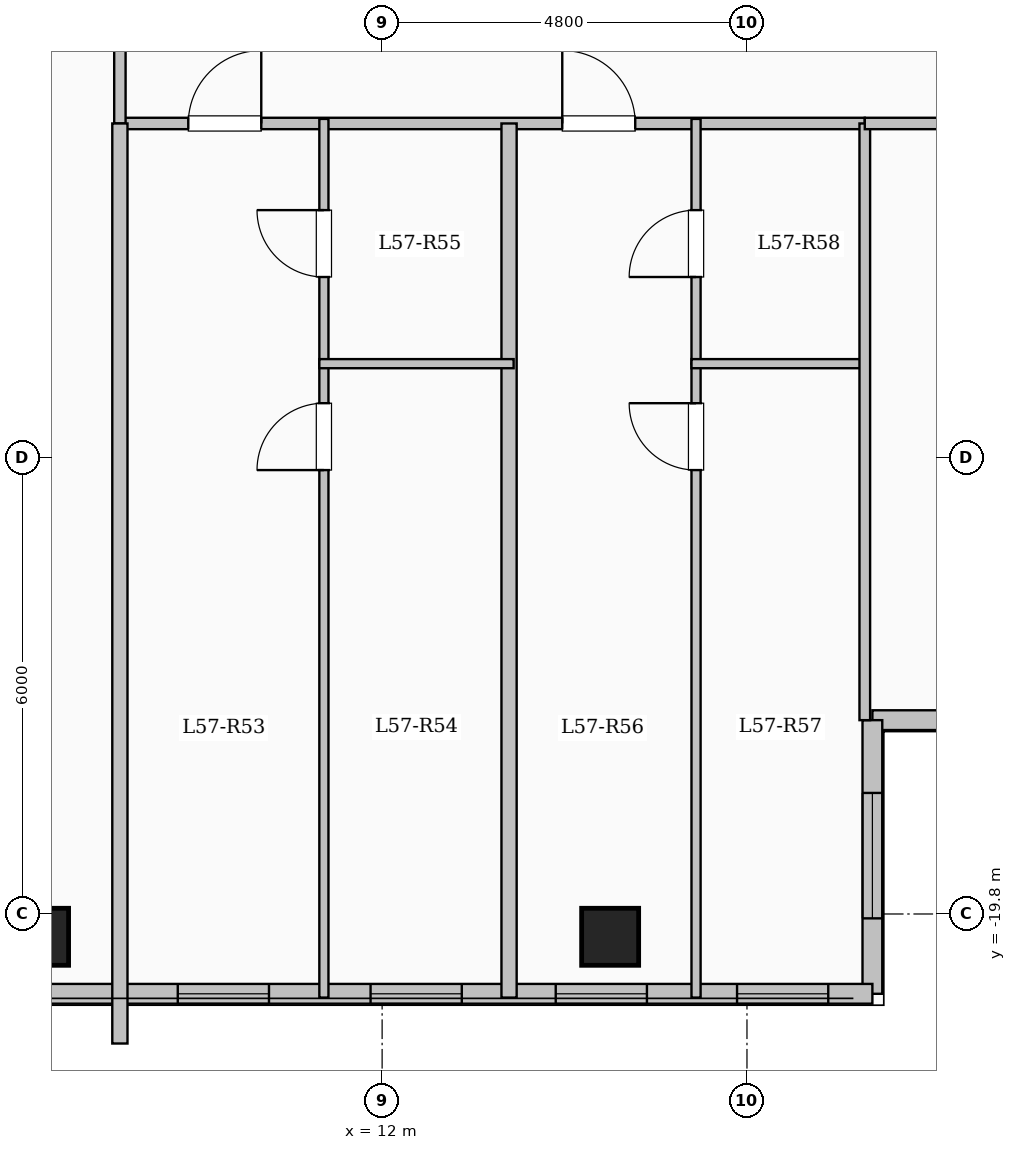
"""IFC4 building model, lengths in metres.
Left out: names, types, materials, properties, quantities, classifications, styles, units other than length and angle.
Written with IfcOpenShell. Run it as: python <this file> out.ifc"""

import sys

from ifc_helpers import new_model, si_unit, direction, frame, frame_2d, origin, origin_2d, place, context, subcontext, project, spatial, rectangle, extrude, element, fill, save


model = new_model("IFC4")
c1 = context("Model", 3, precision=1e-05, world=origin(), true_north=direction((0.0, 1.0)))
c2 = subcontext(c1, "Body", "Model", "MODEL_VIEW")
j1 = project(units=[si_unit("LENGTHUNIT", "METRE"), si_unit("PLANEANGLEUNIT", "RADIAN")], contexts=[c1])
p1 = place(None, origin())
s1 = spatial("IfcSite", under=j1, at=p1, CompositionType="ELEMENT")
p2 = place(p1, origin())
s2 = spatial("IfcBuilding", under=s1, at=p2, CompositionType="ELEMENT")
p3 = place(p2, frame((0.0, 0.0, 210.35)))
s3 = spatial("IfcBuildingStorey", under=s2, at=p3, CompositionType="ELEMENT", Elevation=210.35)
for number, where, z_axis, x_axis in (
    (1, (7.5, -20.1, 0.0), (0.0, 0.0, 1.0), (1.0, 0.0, 0.0)),
    (2, (15.0, -20.1, 0.0), (0.0, 0.0, 1.0), (1.0, 0.0, 0.0)),
):
    element("IfcColumn", number, at=place(p3, frame(where, z_axis=z_axis, x_axis=x_axis)), inside=s3, PredefinedType="COLUMN", context=c2, shape_type="SweptSolid", body=[
        extrude(rectangle(XDim=0.75, YDim=0.75, at=origin_2d()), origin(), (0.0, 0.0, 1.0), 3.35),
    ])
p4 = place(p3, frame((23.55, -17.25, 0.0), z_axis=(0.0, 0.0, 1.0), x_axis=(-1.0, 0.0, 0.0)))
e3 = element("IfcWall", 3, at=p4, inside=s3, PredefinedType="SOLIDWALL", context=c2, shape_type="SweptSolid", body=[
    extrude(rectangle(XDim=5.1, YDim=0.26, at=frame_2d((2.55, 0.0))), origin(), (0.0, 0.0, 1.0), 3.1),
])
p5 = place(p4, frame((1.475, 0.0, 0.9)))
e4 = element("IfcOpeningElement", 4, at=p5, cuts=e3, PredefinedType="OPENING", context=c2, shape_type="SweptSolid", body=[
    extrude(rectangle(XDim=2.2, YDim=1.75, at=frame_2d((1.1, 0.875))), frame((0.0, 0.14, 0.0), z_axis=(0.0, -1.0, 0.0), x_axis=(1.0, 0.0, 0.0)), (0.0, 0.0, 1.0), 0.28),
])
p6 = place(p3, frame((18.45, -17.25, 0.0), z_axis=(0.0, 0.0, 1.0), x_axis=(0.0, -1.0, 0.0)))
e5 = element("IfcWall", 5, at=p6, inside=s3, PredefinedType="SOLIDWALL", context=c2, shape_type="SweptSolid", body=[
    extrude(rectangle(XDim=3.6, YDim=0.26, at=frame_2d((1.8, 0.0))), origin(), (0.0, 0.0, 1.0), 3.1),
])
p7 = place(p6, frame((0.958, 0.0, 0.9)))
e6 = element("IfcOpeningElement", 6, at=p7, cuts=e5, PredefinedType="OPENING", context=c2, shape_type="SweptSolid", body=[
    extrude(rectangle(XDim=1.65, YDim=1.6, at=frame_2d((0.825, 0.8))), frame((0.0, 0.14, 0.0), z_axis=(0.0, -1.0, 0.0), x_axis=(1.0, 0.0, 0.0)), (0.0, 0.0, 1.0), 0.28),
])
p8 = place(p3, frame((18.45, -20.85, 0.0), z_axis=(0.0, 0.0, 1.0), x_axis=(-1.0, 0.0, 0.0)))
e7 = element("IfcWall", 7, at=p8, inside=s3, PredefinedType="SOLIDWALL", context=c2, shape_type="SweptSolid", body=[
    extrude(rectangle(XDim=11.1, YDim=0.26, at=frame_2d((5.55, 0.0))), origin(), (0.0, 0.0, 1.0), 3.1),
])
p9 = place(p8, frame((0.581, 0.0, 0.95)))
e8 = element("IfcOpeningElement", 8, at=p9, cuts=e7, PredefinedType="OPENING", context=c2, shape_type="SweptSolid", body=[
    extrude(rectangle(XDim=1.2, YDim=1.5, at=frame_2d((0.6, 0.75))), frame((0.0, 0.14, 0.0), z_axis=(0.0, -1.0, 0.0), x_axis=(1.0, 0.0, 0.0)), (0.0, 0.0, 1.0), 0.28),
])
p10 = place(p8, frame((2.966, 0.0, 0.95)))
e9 = element("IfcOpeningElement", 9, at=p10, cuts=e7, PredefinedType="OPENING", context=c2, shape_type="SweptSolid", body=[
    extrude(rectangle(XDim=1.2, YDim=1.5, at=frame_2d((0.6, 0.75))), frame((0.0, 0.14, 0.0), z_axis=(0.0, -1.0, 0.0), x_axis=(1.0, 0.0, 0.0)), (0.0, 0.0, 1.0), 0.28),
])
p11 = place(p8, frame((5.402, 0.0, 0.95)))
e10 = element("IfcOpeningElement", 10, at=p11, cuts=e7, PredefinedType="OPENING", context=c2, shape_type="SweptSolid", body=[
    extrude(rectangle(XDim=1.2, YDim=1.5, at=frame_2d((0.6, 0.75))), frame((0.0, 0.14, 0.0), z_axis=(0.0, -1.0, 0.0), x_axis=(1.0, 0.0, 0.0)), (0.0, 0.0, 1.0), 0.28),
])
p12 = place(p8, frame((7.938, 0.0, 0.95)))
e11 = element("IfcOpeningElement", 11, at=p12, cuts=e7, PredefinedType="OPENING", context=c2, shape_type="SweptSolid", body=[
    extrude(rectangle(XDim=1.2, YDim=1.5, at=frame_2d((0.6, 0.75))), frame((0.0, 0.14, 0.0), z_axis=(0.0, -1.0, 0.0), x_axis=(1.0, 0.0, 0.0)), (0.0, 0.0, 1.0), 0.28),
])
p13 = place(p3, frame((8.55, -9.4, 0.0), z_axis=(0.0, 0.0, 1.0), x_axis=(1.0, 0.0, 0.0)))
e12 = element("IfcWall", 12, at=p13, inside=s3, PredefinedType="PARTITIONING", context=c2, shape_type="SweptSolid", body=[
    extrude(rectangle(XDim=9.8, YDim=0.15, at=frame_2d((4.9, 0.0))), origin(), (0.0, 0.0, 1.0), 3.1),
])
p14 = place(p13, frame((0.9, 0.0, 0.0)))
e13 = element("IfcOpeningElement", 13, at=p14, cuts=e12, PredefinedType="OPENING", context=c2, shape_type="SweptSolid", body=[
    extrude(rectangle(XDim=0.96, YDim=2.15, at=frame_2d((0.48, 1.075))), frame((0.0, 0.085, 0.0), z_axis=(0.0, -1.0, 0.0), x_axis=(1.0, 0.0, 0.0)), (0.0, 0.0, 1.0), 0.17),
])
p15 = place(p13, frame((5.82, 0.0, 0.0)))
e14 = element("IfcOpeningElement", 14, at=p15, cuts=e12, PredefinedType="OPENING", context=c2, shape_type="SweptSolid", body=[
    extrude(rectangle(XDim=0.96, YDim=2.15, at=frame_2d((0.48, 1.075))), frame((0.0, 0.085, 0.0), z_axis=(0.0, -1.0, 0.0), x_axis=(1.0, 0.0, 0.0)), (0.0, 0.0, 1.0), 0.17),
])
p16 = place(p3, frame((8.55, -9.4, 0.0), z_axis=(0.0, 0.0, 1.0), x_axis=(0.0, 1.0, 0.0)))
e15 = element("IfcWall", 15, at=p16, inside=s3, PredefinedType="PARTITIONING", context=c2, shape_type="SweptSolid", body=[
    extrude(rectangle(XDim=2.15, YDim=0.15, at=frame_2d((1.075, 0.0))), origin(), (0.0, 0.0, 1.0), 3.1),
])
p17 = place(p3, frame((13.67, -20.9, 0.0), z_axis=(0.0, 0.0, 1.0), x_axis=(0.0, 1.0, 0.0)))
e16 = element("IfcWall", 16, at=p17, inside=s3, PredefinedType="SOLIDWALL", context=c2, shape_type="SweptSolid", body=[
    extrude(rectangle(XDim=11.5, YDim=0.2, at=frame_2d((5.75, 0.0))), origin(), (0.0, 0.0, 1.0), 3.1),
])
p18 = place(p3, frame((11.234, -20.9, 0.0), z_axis=(0.0, 0.0, 1.0), x_axis=(0.0, 1.0, 0.0)))
e17 = element("IfcWall", 17, at=p18, inside=s3, PredefinedType="PARTITIONING", context=c2, shape_type="SweptSolid", body=[
    extrude(rectangle(XDim=8.34, YDim=0.12, at=frame_2d((4.17, 0.0))), origin(), (0.0, 0.0, 1.0), 3.1),
])
p19 = place(p18, frame((6.94, 0.0, 0.0)))
e18 = element("IfcOpeningElement", 18, at=p19, cuts=e17, PredefinedType="OPENING", context=c2, shape_type="SweptSolid", body=[
    extrude(rectangle(XDim=0.88, YDim=2.1, at=frame_2d((0.44, 1.05))), frame((0.0, 0.07, 0.0), z_axis=(0.0, -1.0, 0.0), x_axis=(1.0, 0.0, 0.0)), (0.0, 0.0, 1.0), 0.14),
])
p20 = place(p3, frame((11.234, -12.56, 0.0), z_axis=(0.0, 0.0, 1.0), x_axis=(0.0, 1.0, 0.0)))
e19 = element("IfcWall", 19, at=p20, inside=s3, PredefinedType="PARTITIONING", context=c2, shape_type="SweptSolid", body=[
    extrude(rectangle(XDim=3.22, YDim=0.12, at=frame_2d((1.61, 0.0))), origin(), (0.0, 0.0, 1.0), 3.1),
])
p21 = place(p20, frame((1.14, 0.0, 0.0)))
e20 = element("IfcOpeningElement", 20, at=p21, cuts=e19, PredefinedType="OPENING", context=c2, shape_type="SweptSolid", body=[
    extrude(rectangle(XDim=0.88, YDim=2.1, at=frame_2d((0.44, 1.05))), frame((0.0, 0.07, 0.0), z_axis=(0.0, -1.0, 0.0), x_axis=(1.0, 0.0, 0.0)), (0.0, 0.0, 1.0), 0.14),
])
p22 = place(p3, frame((11.174, -12.56, 0.0), z_axis=(0.0, 0.0, 1.0), x_axis=(1.0, 0.0, 0.0)))
e21 = element("IfcWall", 21, at=p22, inside=s3, PredefinedType="PARTITIONING", context=c2, shape_type="SweptSolid", body=[
    extrude(rectangle(XDim=2.556, YDim=0.12, at=frame_2d((1.278, 0.0))), origin(), (0.0, 0.0, 1.0), 2.725),
])
p23 = place(p3, frame((16.13, -20.9, 0.0), z_axis=(0.0, 0.0, 1.0), x_axis=(0.0, 1.0, 0.0)))
e22 = element("IfcWall", 22, at=p23, inside=s3, PredefinedType="PARTITIONING", context=c2, shape_type="SweptSolid", body=[
    extrude(rectangle(XDim=8.34, YDim=0.12, at=frame_2d((4.17, 0.0))), origin(), (0.0, 0.0, 1.0), 3.1),
])
p24 = place(p23, frame((6.94, 0.0, 0.0)))
e23 = element("IfcOpeningElement", 23, at=p24, cuts=e22, PredefinedType="OPENING", context=c2, shape_type="SweptSolid", body=[
    extrude(rectangle(XDim=0.88, YDim=2.1, at=frame_2d((0.44, 1.05))), frame((0.0, 0.07, 0.0), z_axis=(0.0, -1.0, 0.0), x_axis=(1.0, 0.0, 0.0)), (0.0, 0.0, 1.0), 0.14),
])
p25 = place(p3, frame((16.13, -12.56, 0.0), z_axis=(0.0, 0.0, 1.0), x_axis=(0.0, 1.0, 0.0)))
e24 = element("IfcWall", 24, at=p25, inside=s3, PredefinedType="PARTITIONING", context=c2, shape_type="SweptSolid", body=[
    extrude(rectangle(XDim=3.22, YDim=0.12, at=frame_2d((1.61, 0.0))), origin(), (0.0, 0.0, 1.0), 3.1),
])
p26 = place(p25, frame((1.14, 0.0, 0.0)))
e25 = element("IfcOpeningElement", 25, at=p26, cuts=e24, PredefinedType="OPENING", context=c2, shape_type="SweptSolid", body=[
    extrude(rectangle(XDim=0.88, YDim=2.1, at=frame_2d((0.44, 1.05))), frame((0.0, 0.07, 0.0), z_axis=(0.0, -1.0, 0.0), x_axis=(1.0, 0.0, 0.0)), (0.0, 0.0, 1.0), 0.14),
])
p27 = place(p3, frame((16.07, -12.56, 0.0), z_axis=(0.0, 0.0, 1.0), x_axis=(1.0, 0.0, 0.0)))
e26 = element("IfcWall", 26, at=p27, inside=s3, PredefinedType="PARTITIONING", context=c2, shape_type="SweptSolid", body=[
    extrude(rectangle(XDim=2.34, YDim=0.12, at=frame_2d((1.17, 0.0))), origin(), (0.0, 0.0, 1.0), 3.1),
])
p28 = place(p3, frame((8.55, -21.504, 0.0), z_axis=(0.0, 0.0, 1.0), x_axis=(0.0, 1.0, 0.0)))
e27 = element("IfcWall", 27, at=p28, inside=s3, PredefinedType="SOLIDWALL", context=c2, shape_type="SweptSolid", body=[
    extrude(rectangle(XDim=12.104, YDim=0.2, at=frame_2d((6.052, 0.0))), origin(), (0.0, 0.0, 1.0), 3.1),
])
p29 = place(p3, frame((18.35, -17.25, 0.0), z_axis=(0.0, 0.0, 1.0), x_axis=(0.0, 1.0, 0.0)))
e28 = element("IfcWall", 28, at=p29, inside=s3, PredefinedType="PARTITIONING", context=c2, shape_type="SweptSolid", body=[
    extrude(rectangle(XDim=7.85, YDim=0.14, at=frame_2d((3.925, 0.0))), origin(), (0.0, 0.0, 1.0), 3.1),
])
p30 = place(p3, frame((18.35, -9.4, 0.0), z_axis=(0.0, 0.0, 1.0), x_axis=(1.0, 0.0, 0.0)))
e29 = element("IfcWall", 29, at=p30, inside=s3, PredefinedType="PARTITIONING", context=c2, shape_type="SweptSolid", body=[
    extrude(rectangle(XDim=5.23, YDim=0.15, at=frame_2d((2.615, 0.0))), origin(), (0.0, 0.0, 1.0), 3.1),
])
p31 = place(p30, frame((2.14, 0.0, 0.0)))
e30 = element("IfcOpeningElement", 30, at=p31, cuts=e29, PredefinedType="OPENING", context=c2, shape_type="SweptSolid", body=[
    extrude(rectangle(XDim=0.95, YDim=2.15, at=frame_2d((0.475, 1.075))), frame((0.0, 0.085, 0.0), z_axis=(0.0, -1.0, 0.0), x_axis=(1.0, 0.0, 0.0)), (0.0, 0.0, 1.0), 0.17),
])
p32 = place(p7, origin())
e31 = element("IfcWindow", 31, at=p32, inside=s3, PartitioningType="SINGLE_PANEL", PredefinedType="WINDOW", context=c2, shape_type="SweptSolid", body=[
    extrude(rectangle(XDim=1.65, YDim=1.6, at=frame_2d((0.825, 0.8))), frame((0.0, 0.03, 0.0), z_axis=(0.0, -1.0, 0.0), x_axis=(1.0, 0.0, 0.0)), (0.0, 0.0, 1.0), 0.06),
])
fill(e6, e31)
p33 = place(p9, origin())
e32 = element("IfcWindow", 32, at=p33, inside=s3, PartitioningType="SINGLE_PANEL", PredefinedType="WINDOW", context=c2, shape_type="SweptSolid", body=[
    extrude(rectangle(XDim=1.2, YDim=1.5, at=frame_2d((0.6, 0.75))), frame((0.0, 0.03, 0.0), z_axis=(0.0, -1.0, 0.0), x_axis=(1.0, 0.0, 0.0)), (0.0, 0.0, 1.0), 0.06),
])
fill(e8, e32)
p34 = place(p10, origin())
e33 = element("IfcWindow", 33, at=p34, inside=s3, PartitioningType="SINGLE_PANEL", PredefinedType="WINDOW", context=c2, shape_type="SweptSolid", body=[
    extrude(rectangle(XDim=1.2, YDim=1.5, at=frame_2d((0.6, 0.75))), frame((0.0, 0.03, 0.0), z_axis=(0.0, -1.0, 0.0), x_axis=(1.0, 0.0, 0.0)), (0.0, 0.0, 1.0), 0.06),
])
fill(e9, e33)
p35 = place(p11, origin())
e34 = element("IfcWindow", 34, at=p35, inside=s3, PartitioningType="SINGLE_PANEL", PredefinedType="WINDOW", context=c2, shape_type="SweptSolid", body=[
    extrude(rectangle(XDim=1.2, YDim=1.5, at=frame_2d((0.6, 0.75))), frame((0.0, 0.03, 0.0), z_axis=(0.0, -1.0, 0.0), x_axis=(1.0, 0.0, 0.0)), (0.0, 0.0, 1.0), 0.06),
])
fill(e10, e34)
p36 = place(p12, origin())
e35 = element("IfcWindow", 35, at=p36, inside=s3, PartitioningType="SINGLE_PANEL", PredefinedType="WINDOW", context=c2, shape_type="SweptSolid", body=[
    extrude(rectangle(XDim=1.2, YDim=1.5, at=frame_2d((0.6, 0.75))), frame((0.0, 0.03, 0.0), z_axis=(0.0, -1.0, 0.0), x_axis=(1.0, 0.0, 0.0)), (0.0, 0.0, 1.0), 0.06),
])
fill(e11, e35)
p37 = place(p14, origin())
e36 = element("IfcDoor", 36, at=p37, inside=s3, OperationType="SINGLE_SWING_RIGHT", PredefinedType="DOOR", context=c2, shape_type="SweptSolid", body=[
    extrude(rectangle(XDim=0.96, YDim=2.15, at=frame_2d((0.48, 1.075))), frame((0.0, 0.025, 0.0), z_axis=(0.0, -1.0, 0.0), x_axis=(1.0, 0.0, 0.0)), (0.0, 0.0, 1.0), 0.05),
])
fill(e13, e36)
p38 = place(p19, origin())
e37 = element("IfcDoor", 37, at=p38, inside=s3, OperationType="SINGLE_SWING_LEFT", PredefinedType="DOOR", context=c2, shape_type="SweptSolid", body=[
    extrude(rectangle(XDim=0.88, YDim=2.1, at=frame_2d((0.44, 1.05))), frame((0.0, 0.025, 0.0), z_axis=(0.0, -1.0, 0.0), x_axis=(1.0, 0.0, 0.0)), (0.0, 0.0, 1.0), 0.05),
])
fill(e18, e37)
p39 = place(p21, origin())
e38 = element("IfcDoor", 38, at=p39, inside=s3, OperationType="SINGLE_SWING_RIGHT", PredefinedType="DOOR", context=c2, shape_type="SweptSolid", body=[
    extrude(rectangle(XDim=0.88, YDim=2.1, at=frame_2d((0.44, 1.05))), frame((0.0, 0.025, 0.0), z_axis=(0.0, -1.0, 0.0), x_axis=(1.0, 0.0, 0.0)), (0.0, 0.0, 1.0), 0.05),
])
fill(e20, e38)
p40 = place(p15, origin())
e39 = element("IfcDoor", 39, at=p40, inside=s3, OperationType="SINGLE_SWING_LEFT", PredefinedType="DOOR", context=c2, shape_type="SweptSolid", body=[
    extrude(rectangle(XDim=0.96, YDim=2.15, at=frame_2d((0.48, 1.075))), frame((0.0, 0.025, 0.0), z_axis=(0.0, -1.0, 0.0), x_axis=(1.0, 0.0, 0.0)), (0.0, 0.0, 1.0), 0.05),
])
fill(e14, e39)
p41 = place(p24, origin())
e40 = element("IfcDoor", 40, at=p41, inside=s3, OperationType="SINGLE_SWING_RIGHT", PredefinedType="DOOR", context=c2, shape_type="SweptSolid", body=[
    extrude(rectangle(XDim=0.88, YDim=2.1, at=frame_2d((0.44, 1.05))), frame((0.0, 0.025, 0.0), z_axis=(0.0, -1.0, 0.0), x_axis=(1.0, 0.0, 0.0)), (0.0, 0.0, 1.0), 0.05),
])
fill(e23, e40)
p42 = place(p26, origin())
e41 = element("IfcDoor", 41, at=p42, inside=s3, OperationType="SINGLE_SWING_LEFT", PredefinedType="DOOR", context=c2, shape_type="SweptSolid", body=[
    extrude(rectangle(XDim=0.88, YDim=2.1, at=frame_2d((0.44, 1.05))), frame((0.0, 0.025, 0.0), z_axis=(0.0, -1.0, 0.0), x_axis=(1.0, 0.0, 0.0)), (0.0, 0.0, 1.0), 0.05),
])
fill(e25, e41)
save(model, sys.argv[1])
